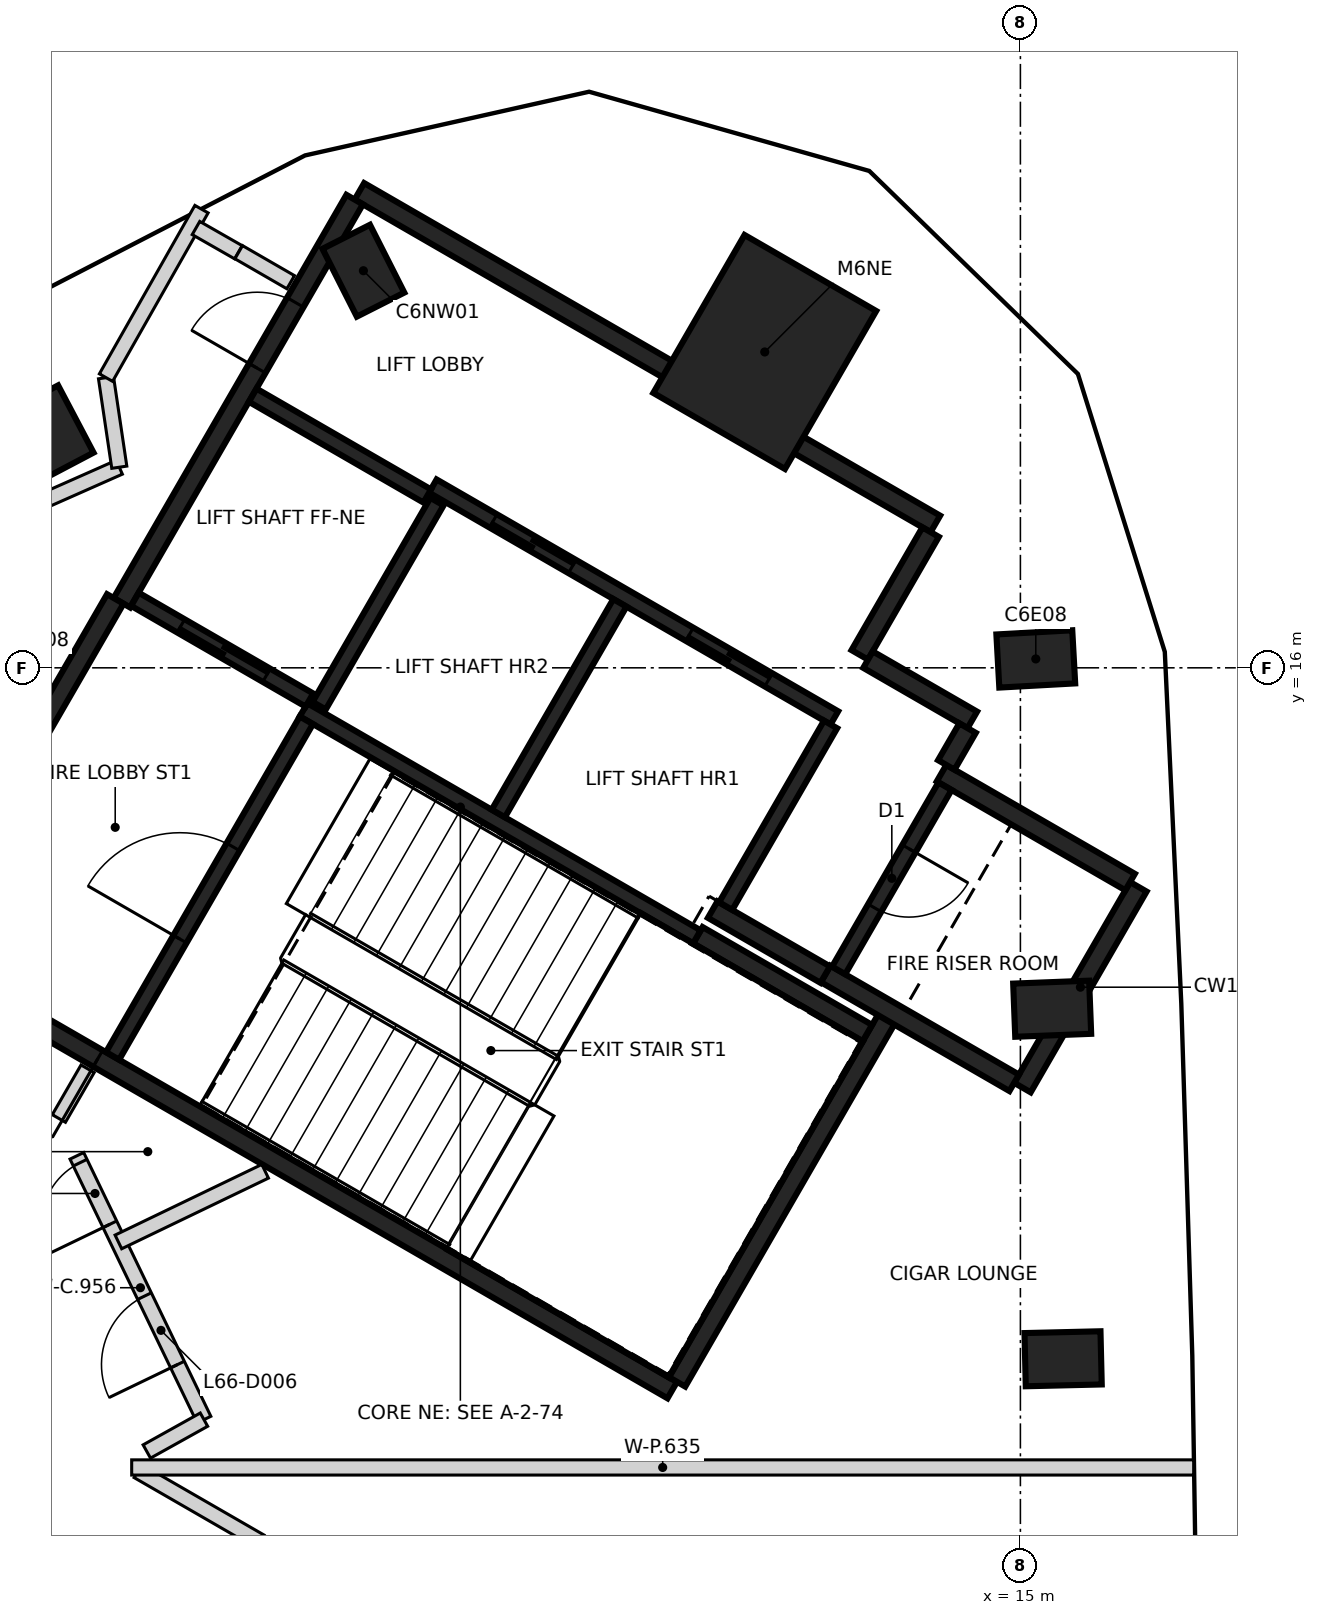
"""IFC4 building model, lengths in metres.
Left out: names, types, materials, properties, quantities, classifications, styles, units other than length and angle.
Written with IfcOpenShell. Run it as: python <this file> out.ifc"""

import sys

from ifc_helpers import new_model, si_unit, direction, frame, frame_2d, origin, origin_2d, place, context, subcontext, project, spatial, rectangle, extrude, element, fill, save


model = new_model("IFC4")
c1 = context("Model", 3, precision=1e-05, world=origin(), true_north=direction((0.0, 1.0)))
c2 = subcontext(c1, "Body", "Model", "MODEL_VIEW")
j1 = project(units=[si_unit("LENGTHUNIT", "METRE"), si_unit("PLANEANGLEUNIT", "RADIAN")], contexts=[c1])
p1 = place(None, origin())
s1 = spatial("IfcSite", under=j1, at=p1, CompositionType="ELEMENT")
p2 = place(p1, origin())
s2 = spatial("IfcBuilding", under=s1, at=p2, CompositionType="ELEMENT")
p3 = place(p2, frame((0.0, 0.0, 262.2)))
s3 = spatial("IfcBuildingStorey", under=s2, at=p3, CompositionType="ELEMENT", Elevation=262.2)
for number, where, z_axis, x_axis in (
    (1, (15.562, 6.91, -0.35), (0.0, 0.0, 1.0), (1.0, 0.024, 0.0)),
    (2, (15.418, 11.515, -0.35), (0.0, 0.0, 1.0), (0.999, 0.039, 0.0)),
    (3, (15.202, 16.117, -0.35), (0.0, 0.0, 1.0), (0.998, 0.055, 0.0)),
    (4, (6.356, 21.224, -0.35), (0.0, 0.0, 1.0), (-0.452, 0.892, 0.0)),
    (5, (2.263, 19.11, -0.35), (0.0, 0.0, 1.0), (-0.466, 0.885, 0.0)),
):
    element("IfcColumn", number, at=place(p3, frame(where, z_axis=z_axis, x_axis=x_axis)), inside=s3, PredefinedType="COLUMN", context=c2, shape_type="SweptSolid", body=[
        extrude(rectangle(XDim=1.0, YDim=0.7, at=origin_2d()), origin(), (0.0, 0.0, 1.0), 3.6),
    ])
p4 = place(p3, frame((11.637, 20.155, -0.35), z_axis=(0.0, 0.0, 1.0), x_axis=(0.5, 0.866025403784, 0.0)))
e6 = element("IfcColumn", 6, at=p4, inside=s3, PredefinedType="COLUMN", context=c2, shape_type="SweptSolid", body=[
    extrude(rectangle(XDim=2.4, YDim=2.0, at=origin_2d()), origin(), (0.0, 0.0, 1.0), 3.6),
])
p5 = place(p3, frame((10.42, 6.498, 0.0), z_axis=(0.0, 0.0, 1.0), x_axis=(-0.866021906294, 0.500006057782, 0.0)))
e7 = element("IfcWall", 7, at=p5, inside=s3, PredefinedType="SHEAR", context=c2, shape_type="SweptSolid", body=[
    extrude(rectangle(XDim=11.55, YDim=0.25, at=frame_2d((5.775, 0.0))), origin(), (0.0, 0.0, 1.0), 3.25),
])
p6 = place(p5, frame((10.025, 0.0, 0.0)))
e8 = element("IfcOpeningElement", 8, at=p6, cuts=e7, PredefinedType="OPENING", context=c2, shape_type="SweptSolid", body=[
    extrude(rectangle(XDim=1.2, YDim=2.1, at=frame_2d((0.6, 1.05))), frame((0.0, 0.135, 0.0), z_axis=(0.0, -1.0, 0.0), x_axis=(1.0, 0.0, 0.0)), (0.0, 0.0, 1.0), 0.27),
])
p7 = place(p5, frame((8.725, 0.0, 0.0)))
e9 = element("IfcOpeningElement", 9, at=p7, cuts=e7, PredefinedType="OPENING", context=c2, shape_type="SweptSolid", body=[
    extrude(rectangle(XDim=1.2, YDim=2.1, at=frame_2d((0.6, 1.05))), frame((0.0, 0.135, 0.0), z_axis=(0.0, -1.0, 0.0), x_axis=(1.0, 0.0, 0.0)), (0.0, 0.0, 1.0), 0.27),
])
p8 = place(p3, frame((6.304, 22.269, 0.0), z_axis=(0.0, 0.0, 1.0), x_axis=(0.866022959057, -0.500004234368, 0.0)))
e10 = element("IfcWall", 10, at=p8, inside=s3, PredefinedType="SHEAR", context=c2, shape_type="SweptSolid", body=[
    extrude(rectangle(XDim=8.75, YDim=0.25, at=frame_2d((4.375, 0.0))), origin(), (0.0, 0.0, 1.0), 3.25),
])
p9 = place(p3, frame((3.179, 16.856, 0.0), z_axis=(0.0, 0.0, 1.0), x_axis=(0.500001955336, 0.866024274868, 0.0)))
e11 = element("IfcWall", 11, at=p9, inside=s3, PredefinedType="SHEAR", context=c2, shape_type="SweptSolid", body=[
    extrude(rectangle(XDim=6.125, YDim=0.25, at=frame_2d((3.062, 0.0))), origin(), (0.0, 0.0, 1.0), 3.25),
])
p10 = place(p9, frame((3.563, 0.0, 0.0)))
e12 = element("IfcOpeningElement", 12, at=p10, cuts=e11, PredefinedType="OPENING", context=c2, shape_type="SweptSolid", body=[
    extrude(rectangle(XDim=1.0, YDim=2.1, at=frame_2d((0.5, 1.05))), frame((0.0, 0.135, 0.0), z_axis=(0.0, -1.0, 0.0), x_axis=(1.0, 0.0, 0.0)), (0.0, 0.0, 1.0), 0.27),
])
p11 = place(p3, frame((0.48, 12.381, 0.0), z_axis=(0.0, 0.0, 1.0), x_axis=(0.49999885962, 0.866026062182, 0.0)))
e13 = element("IfcWall", 13, at=p11, inside=s3, PredefinedType="SHEAR", context=c2, shape_type="SweptSolid", body=[
    extrude(rectangle(XDim=5.225, YDim=0.25, at=frame_2d((2.612, 0.0))), origin(), (0.0, 0.0, 1.0), 3.25),
])
p12 = place(p3, frame((13.238, 11.378, 0.0), z_axis=(0.0, 0.0, 1.0), x_axis=(-0.500008851346, -0.866020293397, 0.0)))
e14 = element("IfcWall", 14, at=p12, inside=s3, PredefinedType="SHEAR", context=c2, shape_type="SweptSolid", body=[
    extrude(rectangle(XDim=5.51, YDim=0.25, at=frame_2d((2.755, 0.0))), origin(), (0.0, 0.0, 1.0), 3.25),
])
p13 = place(p3, frame((16.552, 13.119, 0.0), z_axis=(0.0, 0.0, 1.0), x_axis=(-0.499978833458, -0.866037623948, 0.0)))
e15 = element("IfcWall", 15, at=p13, inside=s3, PredefinedType="SHEAR", context=c2, shape_type="SweptSolid", body=[
    extrude(rectangle(XDim=3.05, YDim=0.25, at=frame_2d((1.525, 0.0))), origin(), (0.0, 0.0, 1.0), 3.25),
])
p14 = place(p3, frame((14.918, 10.54, 0.0), z_axis=(0.0, 0.0, 1.0), x_axis=(-0.866063538972, 0.499933942099, 0.0)))
e16 = element("IfcWall", 16, at=p14, inside=s3, PredefinedType="SHEAR", context=c2, shape_type="SweptSolid", body=[
    extrude(rectangle(XDim=2.865, YDim=0.25, at=frame_2d((1.432, 0.0))), origin(), (0.0, 0.0, 1.0), 3.25),
])
p15 = place(p3, frame((13.963, 14.614, 0.0), z_axis=(0.0, 0.0, 1.0), x_axis=(0.866042235819, -0.499970844928, 0.0)))
e17 = element("IfcWall", 17, at=p15, inside=s3, PredefinedType="SHEAR", context=c2, shape_type="SweptSolid", body=[
    extrude(rectangle(XDim=2.865, YDim=0.25, at=frame_2d((1.432, 0.0))), origin(), (0.0, 0.0, 1.0), 3.25),
])
p16 = place(p3, frame((10.757, 12.481, 0.0), z_axis=(0.0, 0.0, 1.0), x_axis=(0.866022940537, -0.500004266446, 0.0)))
e18 = element("IfcWall", 18, at=p16, inside=s3, PredefinedType="SHEAR", context=c2, shape_type="SweptSolid", body=[
    extrude(rectangle(XDim=2.575, YDim=0.25, at=frame_2d((1.287, 0.0))), origin(), (0.0, 0.0, 1.0), 3.25),
])
p17 = place(p3, frame((13.819, 17.785, 0.0), z_axis=(0.0, 0.0, 1.0), x_axis=(-0.500039802285, -0.866002422705, 0.0)))
e19 = element("IfcWall", 19, at=p17, inside=s3, PredefinedType="SHEAR", context=c2, shape_type="SweptSolid", body=[
    extrude(rectangle(XDim=1.865, YDim=0.25, at=frame_2d((0.932, 0.0))), origin(), (0.0, 0.0, 1.0), 3.25),
])
p18 = place(p3, frame((12.433, 11.964, 0.0), z_axis=(0.0, 0.0, 1.0), x_axis=(-0.866038183914, 0.499977863513, 0.0)))
e20 = element("IfcWall", 20, at=p18, inside=s3, PredefinedType="SHEAR", context=c2, shape_type="SweptSolid", body=[
    extrude(rectangle(XDim=1.71, YDim=0.25, at=frame_2d((0.855, 0.0))), origin(), (0.0, 0.0, 1.0), 3.25),
])
p19 = place(p3, frame((12.995, 16.108, 0.0), z_axis=(0.0, 0.0, 1.0), x_axis=(0.866044474677, -0.49996696679, 0.0)))
e21 = element("IfcWall", 21, at=p19, inside=s3, PredefinedType="SHEAR", context=c2, shape_type="SweptSolid", body=[
    extrude(rectangle(XDim=1.584, YDim=0.25, at=frame_2d((0.792, 0.0))), origin(), (0.0, 0.0, 1.0), 3.25),
])
p20 = place(p3, frame((14.305, 15.207, 0.0), z_axis=(0.0, 0.0, 1.0), x_axis=(-0.499848422343, -0.866112899501, 0.0)))
e22 = element("IfcWall", 22, at=p20, inside=s3, PredefinedType="SHEAR", context=c2, shape_type="SweptSolid", body=[
    extrude(rectangle(XDim=0.559, YDim=0.25, at=frame_2d((0.28, 0.0))), origin(), (0.0, 0.0, 1.0), 3.25),
])
p21 = place(p3, frame((12.552, 15.342, 0.0), z_axis=(0.0, 0.0, 1.0), x_axis=(-0.866030299012, 0.499991521122, 0.0)))
e23 = element("IfcWall", 23, at=p21, inside=s3, PredefinedType="SHEAR", context=c2, shape_type="SweptSolid", body=[
    extrude(rectangle(XDim=6.1, YDim=0.2, at=frame_2d((3.05, 0.0))), origin(), (0.0, 0.0, 1.0), 3.25),
])
p22 = place(p21, frame((1.0, 0.0, 0.0)))
e24 = element("IfcOpeningElement", 24, at=p22, cuts=e23, PredefinedType="OPENING", context=c2, shape_type="SweptSolid", body=[
    extrude(rectangle(XDim=1.2, YDim=2.1, at=frame_2d((0.6, 1.05))), frame((0.0, 0.11, 0.0), z_axis=(0.0, -1.0, 0.0), x_axis=(1.0, 0.0, 0.0)), (0.0, 0.0, 1.0), 0.22),
])
p23 = place(p21, frame((3.982, 0.0, 0.0)))
e25 = element("IfcOpeningElement", 25, at=p23, cuts=e23, PredefinedType="OPENING", context=c2, shape_type="SweptSolid", body=[
    extrude(rectangle(XDim=1.2, YDim=2.1, at=frame_2d((0.6, 1.05))), frame((0.0, 0.11, 0.0), z_axis=(0.0, -1.0, 0.0), x_axis=(1.0, 0.0, 0.0)), (0.0, 0.0, 1.0), 0.22),
])
p24 = place(p3, frame((10.743, 12.46, 0.0), z_axis=(0.0, 0.0, 1.0), x_axis=(-0.866018848283, 0.500011354289, 0.0)))
e26 = element("IfcWall", 26, at=p24, inside=s3, PredefinedType="SHEAR", context=c2, shape_type="SweptSolid", body=[
    extrude(rectangle(XDim=5.974, YDim=0.2, at=frame_2d((2.987, 0.0))), origin(), (0.0, 0.0, 1.0), 3.25),
])
p25 = place(p3, frame((3.057, 10.895, 0.0), z_axis=(0.0, 0.0, 1.0), x_axis=(0.500027839223, 0.866009330205, 0.0)))
e27 = element("IfcWall", 27, at=p25, inside=s3, PredefinedType="SHEAR", context=c2, shape_type="SweptSolid", body=[
    extrude(rectangle(XDim=5.098, YDim=0.2, at=frame_2d((2.549, 0.0))), origin(), (0.0, 0.0, 1.0), 3.25),
])
p26 = place(p25, frame((1.774, 0.0, 0.0)))
e28 = element("IfcOpeningElement", 28, at=p26, cuts=e27, PredefinedType="OPENING", context=c2, shape_type="SweptSolid", body=[
    extrude(rectangle(XDim=1.4, YDim=2.1, at=frame_2d((0.7, 1.05))), frame((0.0, 0.11, 0.0), z_axis=(0.0, -1.0, 0.0), x_axis=(1.0, 0.0, 0.0)), (0.0, 0.0, 1.0), 0.22),
])
p27 = place(p3, frame((8.132, 14.084, 0.0), z_axis=(0.0, 0.0, 1.0), x_axis=(0.500030834389, 0.86600760081, 0.0)))
e29 = element("IfcWall", 29, at=p27, inside=s3, PredefinedType="SHEAR", context=c2, shape_type="SweptSolid", body=[
    extrude(rectangle(XDim=3.198, YDim=0.2, at=frame_2d((1.599, 0.0))), origin(), (0.0, 0.0, 1.0), 3.25),
])
p28 = place(p3, frame((14.008, 14.442, 0.0), z_axis=(0.0, 0.0, 1.0), x_axis=(-0.499986818241, -0.866033014143, 0.0)))
e30 = element("IfcWall", 30, at=p28, inside=s3, PredefinedType="SHEAR", context=c2, shape_type="SweptSolid", body=[
    extrude(rectangle(XDim=2.798, YDim=0.2, at=frame_2d((1.399, 0.0))), origin(), (0.0, 0.0, 1.0), 3.25),
])
p29 = place(p28, frame((0.949, 0.0, 0.0)))
e31 = element("IfcOpeningElement", 31, at=p29, cuts=e30, PredefinedType="OPENING", context=c2, shape_type="SweptSolid", body=[
    extrude(rectangle(XDim=0.9, YDim=2.1, at=frame_2d((0.45, 1.05))), frame((0.0, 0.11, 0.0), z_axis=(0.0, -1.0, 0.0), x_axis=(1.0, 0.0, 0.0)), (0.0, 0.0, 1.0), 0.22),
])
p30 = place(p3, frame((12.502, 15.255, 0.0), z_axis=(0.0, 0.0, 1.0), x_axis=(-0.499965018551, -0.866045599391, 0.0)))
e32 = element("IfcWall", 32, at=p30, inside=s3, PredefinedType="SHEAR", context=c2, shape_type="SweptSolid", body=[
    extrude(rectangle(XDim=2.759, YDim=0.2, at=frame_2d((1.379, 0.0))), origin(), (0.0, 0.0, 1.0), 3.25),
])
p31 = place(p3, frame((7.324, 18.187, 0.0), z_axis=(0.0, 0.0, 1.0), x_axis=(-0.499967891604, -0.866043940782, 0.0)))
e33 = element("IfcWall", 33, at=p31, inside=s3, PredefinedType="SHEAR", context=c2, shape_type="SweptSolid", body=[
    extrude(rectangle(XDim=3.1, YDim=0.2, at=frame_2d((1.55, 0.0))), origin(), (0.0, 0.0, 1.0), 3.25),
])
p32 = place(p3, frame((5.646, 15.576, 0.0), z_axis=(0.0, 0.0, 1.0), x_axis=(-0.866018407898, 0.500012117035, 0.0)))
e34 = element("IfcWall", 34, at=p32, inside=s3, PredefinedType="SHEAR", context=c2, shape_type="SweptSolid", body=[
    extrude(rectangle(XDim=2.651, YDim=0.2, at=frame_2d((1.325, 0.0))), origin(), (0.0, 0.0, 1.0), 3.25),
])
p33 = place(p32, frame((0.652, 0.0, 0.0)))
e35 = element("IfcOpeningElement", 35, at=p33, cuts=e34, PredefinedType="OPENING", context=c2, shape_type="SweptSolid", body=[
    extrude(rectangle(XDim=1.3, YDim=2.1, at=frame_2d((0.65, 1.05))), frame((0.0, 0.11, 0.0), z_axis=(0.0, -1.0, 0.0), x_axis=(1.0, 0.0, 0.0)), (0.0, 0.0, 1.0), 0.22),
])
p34 = place(p3, frame((7.196, 18.26, 0.0), z_axis=(0.0, 0.0, 1.0), x_axis=(-0.866018407898, 0.500012117035, 0.0)))
e36 = element("IfcWall", 36, at=p34, inside=s3, PredefinedType="SHEAR", context=c2, shape_type="SweptSolid", body=[
    extrude(rectangle(XDim=2.651, YDim=0.2, at=frame_2d((1.325, 0.0))), origin(), (0.0, 0.0, 1.0), 3.25),
])
p35 = place(p3, frame((2.021, 18.141, 0.0), z_axis=(0.0, 0.0, 1.0), x_axis=(0.914343087003, 0.404940389748, 0.0)))
e37 = element("IfcWall", 37, at=p35, inside=s3, PredefinedType="PARTITIONING", context=c2, shape_type="SweptSolid", body=[
    extrude(rectangle(XDim=1.229, YDim=0.2, at=frame_2d((0.615, 0.0))), origin(), (0.0, 0.0, 1.0), 3.25),
])
p36 = place(p3, frame((2.35, 10.071, 0.0), z_axis=(0.0, 0.0, 1.0), x_axis=(0.500309905322, 0.865846405916, 0.0)))
e38 = element("IfcWall", 38, at=p36, inside=s3, PredefinedType="PARTITIONING", context=c2, shape_type="SweptSolid", body=[
    extrude(rectangle(XDim=0.755, YDim=0.2, at=frame_2d((0.378, 0.0))), origin(), (0.0, 0.0, 1.0), 3.25),
])
p37 = place(p3, frame((4.26, 6.109, 0.0), z_axis=(0.0, 0.0, 1.0), x_axis=(-0.434189007872, 0.900821794498, 0.0)))
e39 = element("IfcWall", 39, at=p37, inside=s3, PredefinedType="PARTITIONING", context=c2, shape_type="SweptSolid", body=[
    extrude(rectangle(XDim=3.853, YDim=0.2, at=frame_2d((1.926, 0.0))), origin(), (0.0, 0.0, 1.0), 3.25),
])
p38 = place(p37, frame((2.853, 0.0, 0.0)))
e40 = element("IfcOpeningElement", 40, at=p38, cuts=e39, PredefinedType="OPENING", context=c2, shape_type="SweptSolid", body=[
    extrude(rectangle(XDim=0.9, YDim=2.1, at=frame_2d((0.45, 1.05))), frame((0.0, 0.11, 0.0), z_axis=(0.0, -1.0, 0.0), x_axis=(1.0, 0.0, 0.0)), (0.0, 0.0, 1.0), 0.22),
])
p39 = place(p37, frame((0.804, 0.0, 0.0)))
e41 = element("IfcOpeningElement", 41, at=p39, cuts=e39, PredefinedType="OPENING", context=c2, shape_type="SweptSolid", body=[
    extrude(rectangle(XDim=1.0, YDim=2.1, at=frame_2d((0.5, 1.05))), frame((0.0, 0.11, 0.0), z_axis=(0.0, -1.0, 0.0), x_axis=(1.0, 0.0, 0.0)), (0.0, 0.0, 1.0), 0.22),
])
p40 = place(p3, frame((2.97, 19.817, 0.0), z_axis=(0.0, 0.0, 1.0), x_axis=(0.146986994932, -0.989138424752, 0.0)))
e42 = element("IfcWall", 42, at=p40, inside=s3, PredefinedType="PARTITIONING", context=c2, shape_type="SweptSolid", body=[
    extrude(rectangle(XDim=1.191, YDim=0.2, at=frame_2d((0.595, 0.0))), origin(), (0.0, 0.0, 1.0), 2.35),
])
p41 = place(p3, frame((2.97, 19.818, 0.0), z_axis=(0.0, 0.0, 1.0), x_axis=(0.493215654548, 0.86990707441, 0.0)))
e43 = element("IfcWall", 43, at=p41, inside=s3, PredefinedType="PARTITIONING", context=c2, shape_type="SweptSolid", body=[
    extrude(rectangle(XDim=2.548, YDim=0.2, at=frame_2d((1.274, 0.0))), origin(), (0.0, 0.0, 1.0), 3.25),
])
p42 = place(p3, frame((3.39, 5.433, 0.0), z_axis=(0.0, 0.0, 1.0), x_axis=(0.866117799835, -0.499839931186, 0.0)))
e44 = element("IfcWall", 44, at=p42, inside=s3, PredefinedType="PARTITIONING", context=c2, shape_type="SweptSolid", body=[
    extrude(rectangle(XDim=1.859, YDim=0.2, at=frame_2d((0.929, 0.0))), origin(), (0.0, 0.0, 1.0), 3.25),
])
p43 = place(p3, frame((3.507, 5.69, 0.0), z_axis=(0.0, 0.0, 1.0), x_axis=(0.873567976284, 0.486702158215, 0.0)))
e45 = element("IfcWall", 45, at=p43, inside=s3, PredefinedType="PARTITIONING", context=c2, shape_type="SweptSolid", body=[
    extrude(rectangle(XDim=0.861, YDim=0.2, at=frame_2d((0.43, 0.0))), origin(), (0.0, 0.0, 1.0), 3.25),
])
p44 = place(p3, frame((4.154, 21.786, 0.0), z_axis=(0.0, 0.0, 1.0), x_axis=(0.868196374619, -0.496220772539, 0.0)))
e46 = element("IfcWall", 46, at=p44, inside=s3, PredefinedType="PARTITIONING", context=c2, shape_type="SweptSolid", body=[
    extrude(rectangle(XDim=0.643, YDim=0.2, at=frame_2d((0.321, 0.0))), origin(), (0.0, 0.0, 1.0), 3.25),
])
p45 = place(p3, frame((4.716, 21.468, 0.0), z_axis=(0.0, 0.0, 1.0), x_axis=(0.865912682783, -0.500195187698, 0.0)))
e47 = element("IfcWall", 47, at=p45, inside=s3, PredefinedType="PARTITIONING", context=c2, shape_type="SweptSolid", body=[
    extrude(rectangle(XDim=0.79, YDim=0.2, at=frame_2d((0.395, 0.0))), origin(), (0.0, 0.0, 1.0), 3.25),
])
p46 = place(p3, frame((3.133, 8.447, 0.0), z_axis=(0.0, 0.0, 1.0), x_axis=(0.900981876458, 0.433856725538, 0.0)))
e48 = element("IfcWall", 48, at=p46, inside=s3, PredefinedType="PARTITIONING", context=c2, shape_type="SweptSolid", body=[
    extrude(rectangle(XDim=2.143, YDim=0.2, at=frame_2d((1.071, 0.0))), origin(), (0.0, 0.0, 1.0), 3.25),
])
p47 = place(p3, frame((3.308, 5.48, 0.0), z_axis=(0.0, 0.0, 1.0), x_axis=(1.0, 0.0, 0.0)))
e49 = element("IfcWall", 49, at=p47, inside=s3, PredefinedType="PARTITIONING", context=c2, shape_type="SweptSolid", body=[
    extrude(rectangle(XDim=13.971, YDim=0.2, at=frame_2d((6.986, 0.0))), origin(), (0.0, 0.0, 1.0), 2.35),
])
p48 = place(p33, origin())
e50 = element("IfcDoor", 50, at=p48, inside=s3, OperationType="SLIDING_TO_LEFT", PredefinedType="DOOR", context=c2, shape_type="SweptSolid", body=[
    extrude(rectangle(XDim=1.3, YDim=2.1, at=frame_2d((0.65, 1.05))), frame((0.0, 0.025, 0.0), z_axis=(0.0, -1.0, 0.0), x_axis=(1.0, 0.0, 0.0)), (0.0, 0.0, 1.0), 0.05),
])
fill(e35, e50)
p49 = place(p22, origin())
e51 = element("IfcDoor", 51, at=p49, inside=s3, OperationType="DOUBLE_DOOR_SLIDING", PredefinedType="DOOR", context=c2, shape_type="SweptSolid", body=[
    extrude(rectangle(XDim=1.2, YDim=2.1, at=frame_2d((0.6, 1.05))), frame((0.0, 0.025, 0.0), z_axis=(0.0, -1.0, 0.0), x_axis=(1.0, 0.0, 0.0)), (0.0, 0.0, 1.0), 0.05),
])
fill(e24, e51)
p50 = place(p23, origin())
e52 = element("IfcDoor", 52, at=p50, inside=s3, OperationType="DOUBLE_DOOR_SLIDING", PredefinedType="DOOR", context=c2, shape_type="SweptSolid", body=[
    extrude(rectangle(XDim=1.2, YDim=2.1, at=frame_2d((0.6, 1.05))), frame((0.0, 0.025, 0.0), z_axis=(0.0, -1.0, 0.0), x_axis=(1.0, 0.0, 0.0)), (0.0, 0.0, 1.0), 0.05),
])
fill(e25, e52)
p51 = place(p10, origin())
e53 = element("IfcDoor", 53, at=p51, inside=s3, OperationType="SINGLE_SWING_LEFT", PredefinedType="DOOR", context=c2, shape_type="SweptSolid", body=[
    extrude(rectangle(XDim=1.0, YDim=2.1, at=frame_2d((0.5, 1.05))), frame((0.0, 0.025, 0.0), z_axis=(0.0, -1.0, 0.0), x_axis=(1.0, 0.0, 0.0)), (0.0, 0.0, 1.0), 0.05),
])
fill(e12, e53)
p52 = place(p7, origin())
e54 = element("IfcDoor", 54, at=p52, inside=s3, OperationType="SINGLE_SWING_RIGHT", PredefinedType="DOOR", context=c2, shape_type="SweptSolid", body=[
    extrude(rectangle(XDim=1.2, YDim=2.1, at=frame_2d((0.6, 1.05))), frame((0.0, 0.025, 0.0), z_axis=(0.0, -1.0, 0.0), x_axis=(1.0, 0.0, 0.0)), (0.0, 0.0, 1.0), 0.05),
])
fill(e9, e54)
p53 = place(p26, origin())
e55 = element("IfcDoor", 55, at=p53, inside=s3, OperationType="SINGLE_SWING_LEFT", PredefinedType="DOOR", context=c2, shape_type="SweptSolid", body=[
    extrude(rectangle(XDim=1.4, YDim=2.1, at=frame_2d((0.7, 1.05))), frame((0.0, 0.025, 0.0), z_axis=(0.0, -1.0, 0.0), x_axis=(1.0, 0.0, 0.0)), (0.0, 0.0, 1.0), 0.05),
])
fill(e28, e55)
p54 = place(p29, origin())
e56 = element("IfcDoor", 56, at=p54, inside=s3, OperationType="SINGLE_SWING_RIGHT", PredefinedType="DOOR", context=c2, shape_type="SweptSolid", body=[
    extrude(rectangle(XDim=0.9, YDim=2.1, at=frame_2d((0.45, 1.05))), frame((0.0, 0.025, 0.0), z_axis=(0.0, -1.0, 0.0), x_axis=(1.0, 0.0, 0.0)), (0.0, 0.0, 1.0), 0.05),
])
fill(e31, e56)
p55 = place(p38, origin())
e57 = element("IfcDoor", 57, at=p55, inside=s3, OperationType="SINGLE_SWING_LEFT", PredefinedType="DOOR", context=c2, shape_type="SweptSolid", body=[
    extrude(rectangle(XDim=0.9, YDim=2.1, at=frame_2d((0.45, 1.05))), frame((0.0, 0.025, 0.0), z_axis=(0.0, -1.0, 0.0), x_axis=(1.0, 0.0, 0.0)), (0.0, 0.0, 1.0), 0.05),
])
fill(e40, e57)
p56 = place(p39, origin())
e58 = element("IfcDoor", 58, at=p56, inside=s3, OperationType="SINGLE_SWING_LEFT", PredefinedType="DOOR", context=c2, shape_type="SweptSolid", body=[
    extrude(rectangle(XDim=1.0, YDim=2.1, at=frame_2d((0.5, 1.05))), frame((0.0, 0.025, 0.0), z_axis=(0.0, -1.0, 0.0), x_axis=(1.0, 0.0, 0.0)), (0.0, 0.0, 1.0), 0.05),
])
fill(e41, e58)
save(model, sys.argv[1])
